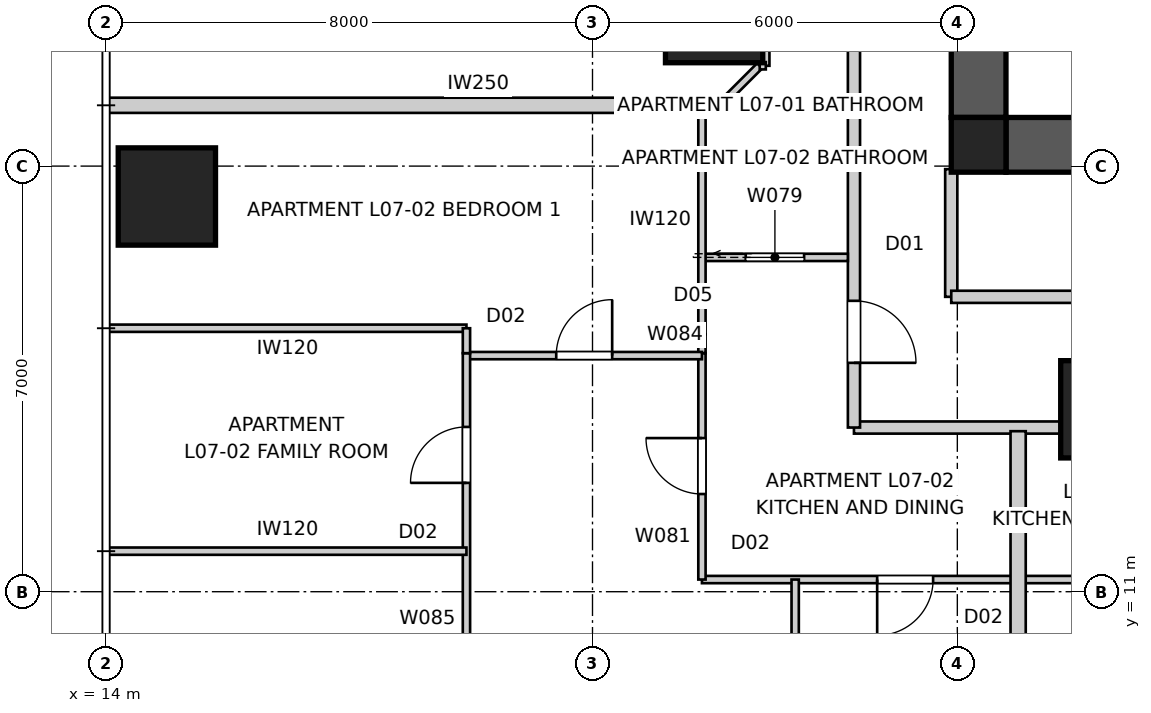
"""IFC4 building model, lengths in metres.
Left out: names, types, materials, properties, quantities, classifications, styles, units other than length and angle.
Written with IfcOpenShell. Run it as: python <this file> out.ifc"""

import sys

from ifc_helpers import new_model, si_unit, direction, frame, frame_2d, origin, origin_2d, place, context, subcontext, project, spatial, polyline, rectangle, outline, extrude, element, fill, save


model = new_model("IFC4")
c1 = context("Model", 3, precision=1e-05, world=origin(), true_north=direction((0.0, 1.0)))
c2 = subcontext(c1, "Body", "Model", "MODEL_VIEW")
j1 = project(units=[si_unit("LENGTHUNIT", "METRE"), si_unit("PLANEANGLEUNIT", "RADIAN")], contexts=[c1])
p1 = place(None, origin())
s1 = spatial("IfcSite", under=j1, at=p1, CompositionType="ELEMENT")
p2 = place(p1, origin())
s2 = spatial("IfcBuilding", under=s1, at=p2, CompositionType="ELEMENT")
p3 = place(p2, frame((0.0, 0.0, 28.6)))
s3 = spatial("IfcBuildingStorey", under=s2, at=p3, CompositionType="ELEMENT", Elevation=28.6)
p4 = place(p3, frame((51.2, 18.35, 0.0), z_axis=(0.0, 0.0, 1.0), x_axis=(-1.0, 0.0, 0.0)))
e1 = element("IfcWall", 1, at=p4, inside=s3, PredefinedType="SHEAR", context=c2, shape_type="SweptSolid", body=[
    extrude(outline(polyline([(0.0, -0.45), (22.4, -0.45), (22.4, -0.025), (22.85, -0.025), (22.85, 0.025), (22.4, 0.025), (22.4, 0.45), (0.0, 0.45), (0.0, 0.025), (-0.45, 0.025), (-0.45, -0.025), (0.0, -0.025), (0.0, -0.45)])), origin(), (0.0, 0.0, 1.0), 3.4),
])
p5 = place(p3, frame((28.35, 41.2, 0.0), z_axis=(0.0, 0.0, 1.0), x_axis=(0.0, -1.0, 0.0)))
e2 = element("IfcWall", 2, at=p5, inside=s3, PredefinedType="SHEAR", context=c2, shape_type="SweptSolid", body=[
    extrude(outline(polyline([(0.0, -0.45), (22.4, -0.45), (22.4, -0.025), (22.85, -0.025), (22.85, 0.025), (22.4, 0.025), (22.4, 0.45), (0.0, 0.45), (0.0, 0.025), (-0.45, 0.025), (-0.45, -0.025), (0.0, -0.025), (0.0, -0.45)])), origin(), (0.0, 0.0, 1.0), 3.4),
])
p6 = place(p5, frame((11.14, 0.0, 0.0)))
e3 = element("IfcOpeningElement", 3, at=p6, cuts=e2, PredefinedType="OPENING", context=c2, shape_type="SweptSolid", body=[
    extrude(rectangle(XDim=1.02, YDim=2.4, at=frame_2d((0.51, 1.2))), frame((0.0, 0.46, 0.0), z_axis=(0.0, -1.0, 0.0), x_axis=(1.0, 0.0, 0.0)), (0.0, 0.0, 1.0), 0.92),
])
p7 = place(p3, frame((28.35, 18.35, 0.0), z_axis=(0.0, 0.0, 1.0), x_axis=(1.0, 0.0, 0.0)))
e4 = element("IfcColumn", 4, at=p7, inside=s3, PredefinedType="COLUMN", context=c2, shape_type="SweptSolid", body=[
    extrude(rectangle(XDim=0.9, YDim=0.9, at=origin_2d()), origin(), (0.0, 0.0, 1.0), 3.4),
])
for number, where, z_axis, x_axis in (
    (5, (15.0, 17.5, 0.0), (0.0, 0.0, 1.0), (1.0, 0.0, 0.0)),
    (6, (24.0, 20.5, 0.0), (0.0, 0.0, 1.0), (1.0, 0.0, 0.0)),
    (7, (30.5, 14.0, 0.0), (0.0, 0.0, 1.0), (1.0, 0.0, 0.0)),
):
    element("IfcColumn", number, at=place(p3, frame(where, z_axis=z_axis, x_axis=x_axis)), inside=s3, PredefinedType="COLUMN", context=c2, shape_type="SweptSolid", body=[
        extrude(rectangle(XDim=1.6, YDim=1.6, at=origin_2d()), origin(), (0.0, 0.0, 1.0), 3.4),
    ])
p8 = place(p3, frame((26.3, 13.7, 0.0), z_axis=(0.0, 0.0, 1.0), x_axis=(1.0, 0.0, 0.0)))
e8 = element("IfcWall", 8, at=p8, inside=s3, PredefinedType="PARTITIONING", context=c2, shape_type="SweptSolid", body=[
    extrude(rectangle(XDim=4.458, YDim=0.2, at=frame_2d((2.229, 0.0))), origin(), (0.0, 0.0, 1.0), 3.25),
])
p9 = place(p3, frame((26.3, 46.3, 0.0), z_axis=(0.0, 0.0, 1.0), x_axis=(0.0, -1.0, 0.0)))
e9 = element("IfcWall", 9, at=p9, inside=s3, PredefinedType="PARTITIONING", context=c2, shape_type="SweptSolid", body=[
    extrude(rectangle(XDim=32.6, YDim=0.2, at=frame_2d((16.3, 0.0))), origin(), (0.0, 0.0, 1.0), 3.25),
])
p10 = place(p9, frame((2.315, 0.0, 0.0)))
e10 = element("IfcOpeningElement", 10, at=p10, cuts=e9, PredefinedType="OPENING", context=c2, shape_type="SweptSolid", body=[
    extrude(rectangle(XDim=1.02, YDim=2.34, at=frame_2d((0.51, 1.17))), frame((0.0, 0.11, 0.0), z_axis=(0.0, -1.0, 0.0), x_axis=(1.0, 0.0, 0.0)), (0.0, 0.0, 1.0), 0.22),
])
p11 = place(p9, frame((10.624, 0.0, 0.0)))
e11 = element("IfcOpeningElement", 11, at=p11, cuts=e9, PredefinedType="OPENING", context=c2, shape_type="SweptSolid", body=[
    extrude(rectangle(XDim=1.02, YDim=2.34, at=frame_2d((0.51, 1.17))), frame((0.0, 0.11, 0.0), z_axis=(0.0, -1.0, 0.0), x_axis=(1.0, 0.0, 0.0)), (0.0, 0.0, 1.0), 0.22),
])
p12 = place(p9, frame((17.848, 0.0, 0.0)))
e12 = element("IfcOpeningElement", 12, at=p12, cuts=e9, PredefinedType="OPENING", context=c2, shape_type="SweptSolid", body=[
    extrude(rectangle(XDim=1.02, YDim=2.34, at=frame_2d((0.51, 1.17))), frame((0.0, 0.11, 0.0), z_axis=(0.0, -1.0, 0.0), x_axis=(1.0, 0.0, 0.0)), (0.0, 0.0, 1.0), 0.22),
])
p13 = place(p9, frame((30.516, 0.0, 0.0)))
e13 = element("IfcOpeningElement", 13, at=p13, cuts=e9, PredefinedType="OPENING", context=c2, shape_type="SweptSolid", body=[
    extrude(rectangle(XDim=1.02, YDim=2.34, at=frame_2d((0.51, 1.17))), frame((0.0, 0.11, 0.0), z_axis=(0.0, -1.0, 0.0), x_axis=(1.0, 0.0, 0.0)), (0.0, 0.0, 1.0), 0.22),
])
p14 = place(p3, frame((29.0, 4.0, 0.0), z_axis=(0.0, 0.0, 1.0), x_axis=(0.0, 1.0, 0.0)))
e14 = element("IfcWall", 14, at=p14, inside=s3, PredefinedType="PARTITIONING", context=c2, shape_type="SweptSolid", body=[
    extrude(rectangle(XDim=9.64, YDim=0.25, at=frame_2d((4.82, 0.0))), origin(), (0.0, 0.0, 1.0), 3.25),
])
p15 = place(p3, frame((14.0, 19.0, 0.0), z_axis=(0.0, 0.0, 1.0), x_axis=(1.0, 0.0, 0.0)))
e15 = element("IfcWall", 15, at=p15, inside=s3, PredefinedType="PARTITIONING", context=c2, shape_type="SweptSolid", body=[
    extrude(rectangle(XDim=12.24, YDim=0.25, at=frame_2d((6.12, 0.0))), origin(), (0.0, 0.0, 1.0), 3.25),
])
p16 = place(p3, frame((27.9, 17.95, 0.0), z_axis=(0.0, 0.0, 1.0), x_axis=(0.0, -1.0, 0.0)))
e16 = element("IfcWall", 16, at=p16, inside=s3, PredefinedType="PARTITIONING", context=c2, shape_type="SweptSolid", body=[
    extrude(rectangle(XDim=2.1, YDim=0.2, at=frame_2d((1.05, 0.0))), origin(), (0.0, 0.0, 1.0), 3.25),
])
p17 = place(p3, frame((27.9, 15.85, 0.0), z_axis=(0.0, 0.0, 1.0), x_axis=(1.0, 0.0, 0.0)))
e17 = element("IfcWall", 17, at=p17, inside=s3, PredefinedType="PARTITIONING", context=c2, shape_type="SweptSolid", body=[
    extrude(rectangle(XDim=24.2, YDim=0.2, at=frame_2d((12.1, 0.0))), origin(), (0.0, 0.0, 1.0), 3.25),
])
p18 = place(p17, frame((12.437, 0.0, 0.0)))
e18 = element("IfcOpeningElement", 18, at=p18, cuts=e17, PredefinedType="OPENING", context=c2, shape_type="SweptSolid", body=[
    extrude(rectangle(XDim=1.02, YDim=2.1, at=frame_2d((0.51, 1.05))), frame((0.0, 0.11, 0.0), z_axis=(0.0, -1.0, 0.0), x_axis=(1.0, 0.0, 0.0)), (0.0, 0.0, 1.0), 0.22),
])
p19 = place(p17, frame((3.544, 0.0, 0.0)))
e19 = element("IfcOpeningElement", 19, at=p19, cuts=e17, PredefinedType="OPENING", context=c2, shape_type="SweptSolid", body=[
    extrude(rectangle(XDim=1.02, YDim=2.1, at=frame_2d((0.51, 1.05))), frame((0.0, 0.11, 0.0), z_axis=(0.0, -1.0, 0.0), x_axis=(1.0, 0.0, 0.0)), (0.0, 0.0, 1.0), 0.22),
])
p20 = place(p17, frame((19.733, 0.0, 0.0)))
e20 = element("IfcOpeningElement", 20, at=p20, cuts=e17, PredefinedType="OPENING", context=c2, shape_type="SweptSolid", body=[
    extrude(rectangle(XDim=1.02, YDim=2.1, at=frame_2d((0.51, 1.05))), frame((0.0, 0.11, 0.0), z_axis=(0.0, -1.0, 0.0), x_axis=(1.0, 0.0, 0.0)), (0.0, 0.0, 1.0), 0.22),
])
p21 = place(p3, frame((24.1, 19.0, 0.0), z_axis=(0.0, 0.0, 1.0), x_axis=(0.707106781187, 0.707106781187, 0.0)))
e21 = element("IfcWall", 21, at=p21, inside=s3, PredefinedType="PARTITIONING", context=c2, shape_type="SweptSolid", body=[
    extrude(rectangle(XDim=0.919, YDim=0.12, at=frame_2d((0.459, 0.0))), origin(), (0.0, 0.0, 1.0), 3.25),
])
p22 = place(p3, frame((24.85, 19.65, 0.0), z_axis=(0.0, 0.0, 1.0), x_axis=(0.0, 1.0, 0.0)))
e22 = element("IfcWall", 22, at=p22, inside=s3, PredefinedType="PARTITIONING", context=c2, shape_type="SweptSolid", body=[
    extrude(rectangle(XDim=1.7, YDim=0.12, at=frame_2d((0.85, 0.0))), origin(), (0.0, 0.0, 1.0), 3.25),
])
p23 = place(p3, frame((23.8, 16.499, 0.0), z_axis=(0.0, 0.0, 1.0), x_axis=(1.0, 0.0, 0.0)))
e23 = element("IfcWall", 23, at=p23, inside=s3, PredefinedType="PARTITIONING", context=c2, shape_type="SweptSolid", body=[
    extrude(rectangle(XDim=2.4, YDim=0.12, at=frame_2d((1.2, 0.0))), origin(), (0.0, 0.0, 1.0), 3.25),
])
p24 = place(p23, frame((0.72, 0.0, 0.0)))
e24 = element("IfcOpeningElement", 24, at=p24, cuts=e23, PredefinedType="OPENING", context=c2, shape_type="SweptSolid", body=[
    extrude(rectangle(XDim=0.96, YDim=2.1, at=frame_2d((0.48, 1.05))), frame((0.0, 0.07, 0.0), z_axis=(0.0, -1.0, 0.0), x_axis=(1.0, 0.0, 0.0)), (0.0, 0.0, 1.0), 0.14),
])
p25 = place(p3, frame((56.2, 11.2, 0.0), z_axis=(0.0, 0.0, 1.0), x_axis=(-1.0, 0.0, 0.0)))
e25 = element("IfcWall", 25, at=p25, inside=s3, PredefinedType="PARTITIONING", context=c2, shape_type="SweptSolid", body=[
    extrude(rectangle(XDim=32.4, YDim=0.12, at=frame_2d((16.2, 0.0))), origin(), (0.0, 0.0, 1.0), 3.25),
])
p26 = place(p25, frame((24.882, 0.0, 0.0)))
e26 = element("IfcOpeningElement", 26, at=p26, cuts=e25, PredefinedType="OPENING", context=c2, shape_type="SweptSolid", body=[
    extrude(rectangle(XDim=0.92, YDim=2.34, at=frame_2d((0.46, 1.17))), frame((0.0, 0.07, 0.0), z_axis=(0.0, -1.0, 0.0), x_axis=(1.0, 0.0, 0.0)), (0.0, 0.0, 1.0), 0.14),
])
p27 = place(p25, frame((22.477, 0.0, 0.0)))
e27 = element("IfcOpeningElement", 27, at=p27, cuts=e25, PredefinedType="OPENING", context=c2, shape_type="SweptSolid", body=[
    extrude(rectangle(XDim=0.92, YDim=2.34, at=frame_2d((0.46, 1.17))), frame((0.0, 0.07, 0.0), z_axis=(0.0, -1.0, 0.0), x_axis=(1.0, 0.0, 0.0)), (0.0, 0.0, 1.0), 0.14),
])
p28 = place(p25, frame((6.598, 0.0, 0.0)))
e28 = element("IfcOpeningElement", 28, at=p28, cuts=e25, PredefinedType="OPENING", context=c2, shape_type="SweptSolid", body=[
    extrude(rectangle(XDim=0.92, YDim=2.34, at=frame_2d((0.46, 1.17))), frame((0.0, 0.07, 0.0), z_axis=(0.0, -1.0, 0.0), x_axis=(1.0, 0.0, 0.0)), (0.0, 0.0, 1.0), 0.14),
])
p29 = place(p25, frame((28.598, 0.0, 0.0)))
e29 = element("IfcOpeningElement", 29, at=p29, cuts=e25, PredefinedType="OPENING", context=c2, shape_type="SweptSolid", body=[
    extrude(rectangle(XDim=0.92, YDim=2.34, at=frame_2d((0.46, 1.17))), frame((0.0, 0.07, 0.0), z_axis=(0.0, -1.0, 0.0), x_axis=(1.0, 0.0, 0.0)), (0.0, 0.0, 1.0), 0.14),
])
p30 = place(p25, frame((2.862, 0.0, 0.0)))
e30 = element("IfcOpeningElement", 30, at=p30, cuts=e25, PredefinedType="OPENING", context=c2, shape_type="SweptSolid", body=[
    extrude(rectangle(XDim=0.96, YDim=2.1, at=frame_2d((0.48, 1.05))), frame((0.0, 0.07, 0.0), z_axis=(0.0, -1.0, 0.0), x_axis=(1.0, 0.0, 0.0)), (0.0, 0.0, 1.0), 0.14),
])
p31 = place(p25, frame((10.363, 0.0, 0.0)))
e31 = element("IfcOpeningElement", 31, at=p31, cuts=e25, PredefinedType="OPENING", context=c2, shape_type="SweptSolid", body=[
    extrude(rectangle(XDim=0.96, YDim=2.1, at=frame_2d((0.48, 1.05))), frame((0.0, 0.07, 0.0), z_axis=(0.0, -1.0, 0.0), x_axis=(1.0, 0.0, 0.0)), (0.0, 0.0, 1.0), 0.14),
])
p32 = place(p25, frame((13.862, 0.0, 0.0)))
e32 = element("IfcOpeningElement", 32, at=p32, cuts=e25, PredefinedType="OPENING", context=c2, shape_type="SweptSolid", body=[
    extrude(rectangle(XDim=0.96, YDim=2.1, at=frame_2d((0.48, 1.05))), frame((0.0, 0.07, 0.0), z_axis=(0.0, -1.0, 0.0), x_axis=(1.0, 0.0, 0.0)), (0.0, 0.0, 1.0), 0.14),
])
p33 = place(p25, frame((17.529, 0.0, 0.0)))
e33 = element("IfcOpeningElement", 33, at=p33, cuts=e25, PredefinedType="OPENING", context=c2, shape_type="SweptSolid", body=[
    extrude(rectangle(XDim=0.96, YDim=2.1, at=frame_2d((0.48, 1.05))), frame((0.0, 0.07, 0.0), z_axis=(0.0, -1.0, 0.0), x_axis=(1.0, 0.0, 0.0)), (0.0, 0.0, 1.0), 0.14),
])
p34 = place(p3, frame((23.8, 11.2, 0.0), z_axis=(0.0, 0.0, 1.0), x_axis=(0.0, 1.0, 0.0)))
e34 = element("IfcWall", 34, at=p34, inside=s3, PredefinedType="PARTITIONING", context=c2, shape_type="SweptSolid", body=[
    extrude(rectangle(XDim=3.723, YDim=0.12, at=frame_2d((1.862, 0.0))), origin(), (0.0, 0.0, 1.0), 3.25),
])
p35 = place(p34, frame((1.407, 0.0, 0.0)))
e35 = element("IfcOpeningElement", 35, at=p35, cuts=e34, PredefinedType="OPENING", context=c2, shape_type="SweptSolid", body=[
    extrude(rectangle(XDim=0.92, YDim=2.34, at=frame_2d((0.46, 1.17))), frame((0.0, 0.07, 0.0), z_axis=(0.0, -1.0, 0.0), x_axis=(1.0, 0.0, 0.0)), (0.0, 0.0, 1.0), 0.14),
])
p36 = place(p3, frame((23.8, 15.233, 0.0), z_axis=(0.0, 0.0, 1.0), x_axis=(0.0, 1.0, 0.0)))
e36 = element("IfcWall", 36, at=p36, inside=s3, PredefinedType="PARTITIONING", context=c2, shape_type="SweptSolid", body=[
    extrude(rectangle(XDim=3.767, YDim=0.12, at=frame_2d((1.883, 0.0))), origin(), (0.0, 0.0, 1.0), 3.25),
])
p37 = place(p3, frame((19.927, 14.883, 0.0), z_axis=(0.0, 0.0, 1.0), x_axis=(1.0, 0.0, 0.0)))
e37 = element("IfcWall", 37, at=p37, inside=s3, PredefinedType="PARTITIONING", context=c2, shape_type="SweptSolid", body=[
    extrude(rectangle(XDim=3.873, YDim=0.12, at=frame_2d((1.937, 0.0))), origin(), (0.0, 0.0, 1.0), 3.25),
])
p38 = place(p37, frame((1.477, 0.0, 0.0)))
e38 = element("IfcOpeningElement", 38, at=p38, cuts=e37, PredefinedType="OPENING", context=c2, shape_type="SweptSolid", body=[
    extrude(rectangle(XDim=0.92, YDim=2.34, at=frame_2d((0.46, 1.17))), frame((0.0, 0.07, 0.0), z_axis=(0.0, -1.0, 0.0), x_axis=(1.0, 0.0, 0.0)), (0.0, 0.0, 1.0), 0.14),
])
p39 = place(p3, frame((19.927, 4.04, 0.0), z_axis=(0.0, 0.0, 1.0), x_axis=(0.0, 1.0, 0.0)))
e39 = element("IfcWall", 39, at=p39, inside=s3, PredefinedType="PARTITIONING", context=c2, shape_type="SweptSolid", body=[
    extrude(rectangle(XDim=10.883, YDim=0.12, at=frame_2d((5.442, 0.0))), origin(), (0.0, 0.0, 1.0), 3.25),
])
p40 = place(p39, frame((3.358, 0.0, 0.0)))
e40 = element("IfcOpeningElement", 40, at=p40, cuts=e39, PredefinedType="OPENING", context=c2, shape_type="SweptSolid", body=[
    extrude(rectangle(XDim=0.92, YDim=2.34, at=frame_2d((0.46, 1.17))), frame((0.0, 0.07, 0.0), z_axis=(0.0, -1.0, 0.0), x_axis=(1.0, 0.0, 0.0)), (0.0, 0.0, 1.0), 0.14),
])
p41 = place(p39, frame((8.75, 0.0, 0.0)))
e41 = element("IfcOpeningElement", 41, at=p41, cuts=e39, PredefinedType="OPENING", context=c2, shape_type="SweptSolid", body=[
    extrude(rectangle(XDim=0.92, YDim=2.34, at=frame_2d((0.46, 1.17))), frame((0.0, 0.07, 0.0), z_axis=(0.0, -1.0, 0.0), x_axis=(1.0, 0.0, 0.0)), (0.0, 0.0, 1.0), 0.14),
])
p42 = place(p3, frame((25.333, 11.2, 0.0), z_axis=(0.0, 0.0, 1.0), x_axis=(0.0, -1.0, 0.0)))
e42 = element("IfcWall", 42, at=p42, inside=s3, PredefinedType="PARTITIONING", context=c2, shape_type="SweptSolid", body=[
    extrude(rectangle(XDim=7.16, YDim=0.12, at=frame_2d((3.58, 0.0))), origin(), (0.0, 0.0, 1.0), 2.638),
])
p43 = place(p3, frame((19.927, 15.333, 0.0), z_axis=(0.0, 0.0, 1.0), x_axis=(-1.0, 0.0, 0.0)))
e43 = element("IfcWall", 43, at=p43, inside=s3, PredefinedType="PARTITIONING", context=c2, shape_type="SweptSolid", body=[
    extrude(rectangle(XDim=5.887, YDim=0.12, at=frame_2d((2.943, 0.0))), origin(), (0.0, 0.0, 1.0), 2.638),
])
p44 = place(p3, frame((14.04, 11.667, 0.0), z_axis=(0.0, 0.0, 1.0), x_axis=(1.0, 0.0, 0.0)))
e44 = element("IfcWall", 44, at=p44, inside=s3, PredefinedType="PARTITIONING", context=c2, shape_type="SweptSolid", body=[
    extrude(rectangle(XDim=5.887, YDim=0.12, at=frame_2d((2.943, 0.0))), origin(), (0.0, 0.0, 1.0), 3.25),
])
p45 = place(p3, frame((24.85, 19.65, 0.0), z_axis=(0.0, 0.0, 1.0), x_axis=(-1.0, 0.0, 0.0)))
e45 = element("IfcWall", 45, at=p45, inside=s3, PredefinedType="PARTITIONING", context=c2, shape_type="SweptSolid", body=[
    extrude(rectangle(XDim=0.1, YDim=0.12, at=frame_2d((0.05, 0.0))), origin(), (0.0, 0.0, 1.0), 3.25),
])
p46 = place(p3, frame((23.8, 15.233, 0.0), z_axis=(0.0, 0.0, 1.0), x_axis=(0.0, -1.0, 0.0)))
e46 = element("IfcWall", 46, at=p46, inside=s3, PredefinedType="PARTITIONING", context=c2, shape_type="SweptSolid", body=[
    extrude(rectangle(XDim=0.31, YDim=0.12, at=frame_2d((0.155, 0.0))), origin(), (0.0, 0.0, 1.0), 3.25),
])
p47 = place(p3, frame((19.927, 15.333, 0.0), z_axis=(0.0, 0.0, 1.0), x_axis=(0.0, -1.0, 0.0)))
e47 = element("IfcWall", 47, at=p47, inside=s3, PredefinedType="PARTITIONING", context=c2, shape_type="SweptSolid", body=[
    extrude(rectangle(XDim=0.41, YDim=0.12, at=frame_2d((0.205, 0.0))), origin(), (0.0, 0.0, 1.0), 3.25),
])
p48 = place(p13, origin())
e48 = element("IfcDoor", 48, at=p48, inside=s3, OperationType="SINGLE_SWING_RIGHT", PredefinedType="DOOR", context=c2, shape_type="SweptSolid", body=[
    extrude(rectangle(XDim=1.02, YDim=2.34, at=frame_2d((0.51, 1.17))), frame((0.0, 0.025, 0.0), z_axis=(0.0, -1.0, 0.0), x_axis=(1.0, 0.0, 0.0)), (0.0, 0.0, 1.0), 0.05),
])
fill(e13, e48)
p49 = place(p35, origin())
e49 = element("IfcDoor", 49, at=p49, inside=s3, OperationType="SINGLE_SWING_RIGHT", PredefinedType="DOOR", context=c2, shape_type="SweptSolid", body=[
    extrude(rectangle(XDim=0.92, YDim=2.34, at=frame_2d((0.46, 1.17))), frame((0.0, 0.025, 0.0), z_axis=(0.0, -1.0, 0.0), x_axis=(1.0, 0.0, 0.0)), (0.0, 0.0, 1.0), 0.05),
])
fill(e35, e49)
p50 = place(p29, origin())
e50 = element("IfcDoor", 50, at=p50, inside=s3, OperationType="SINGLE_SWING_RIGHT", PredefinedType="DOOR", context=c2, shape_type="SweptSolid", body=[
    extrude(rectangle(XDim=0.92, YDim=2.34, at=frame_2d((0.46, 1.17))), frame((0.0, 0.025, 0.0), z_axis=(0.0, -1.0, 0.0), x_axis=(1.0, 0.0, 0.0)), (0.0, 0.0, 1.0), 0.05),
])
fill(e29, e50)
p51 = place(p24, origin())
e51 = element("IfcDoor", 51, at=p51, inside=s3, OperationType="SLIDING_TO_LEFT", PredefinedType="DOOR", context=c2, shape_type="SweptSolid", body=[
    extrude(rectangle(XDim=0.96, YDim=2.1, at=frame_2d((0.48, 1.05))), frame((0.0, 0.025, 0.0), z_axis=(0.0, -1.0, 0.0), x_axis=(1.0, 0.0, 0.0)), (0.0, 0.0, 1.0), 0.05),
])
fill(e24, e51)
p52 = place(p38, origin())
e52 = element("IfcDoor", 52, at=p52, inside=s3, OperationType="SINGLE_SWING_RIGHT", PredefinedType="DOOR", context=c2, shape_type="SweptSolid", body=[
    extrude(rectangle(XDim=0.92, YDim=2.34, at=frame_2d((0.46, 1.17))), frame((0.0, 0.025, 0.0), z_axis=(0.0, -1.0, 0.0), x_axis=(1.0, 0.0, 0.0)), (0.0, 0.0, 1.0), 0.05),
])
fill(e38, e52)
p53 = place(p41, origin())
e53 = element("IfcDoor", 53, at=p53, inside=s3, OperationType="SINGLE_SWING_LEFT", PredefinedType="DOOR", context=c2, shape_type="SweptSolid", body=[
    extrude(rectangle(XDim=0.92, YDim=2.34, at=frame_2d((0.46, 1.17))), frame((0.0, 0.025, 0.0), z_axis=(0.0, -1.0, 0.0), x_axis=(1.0, 0.0, 0.0)), (0.0, 0.0, 1.0), 0.05),
])
fill(e41, e53)
save(model, sys.argv[1])
